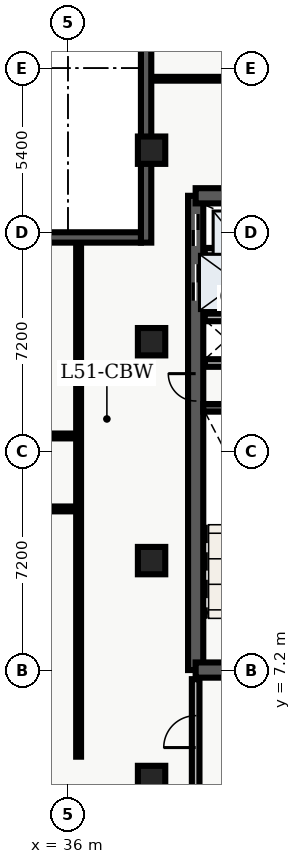
"""IFC4 building model, lengths in metres.
Left out: names, types, materials, properties, quantities, classifications, styles, units other than length and angle.
Written with IfcOpenShell. Run it as: python <this file> out.ifc"""

import sys

from ifc_helpers import new_model, entity, si_unit, converted_unit, direction, frame, origin_with_axes, origin_2d_with_axis, place, context, subcontext, project, spatial, polyline, rectangle, outline, extrude, element, fill, save


model = new_model("IFC4")
c1 = context("Model", 3, precision=1e-05, world=origin_with_axes(), true_north=direction((0.0, 1.0)))
c2 = subcontext(c1, "Body", "Model", "MODEL_VIEW")
j1 = project(units=[si_unit("LENGTHUNIT", "METRE"), converted_unit("PLANEANGLEUNIT", "DEGREE", entity("IfcPlaneAngleMeasure", 0.017), si_unit("PLANEANGLEUNIT", "RADIAN"), dimensions=[0, 0, 0, 0, 0, 0, 0])], contexts=[c1])
p1 = place(None, origin_with_axes())
s1 = spatial("IfcSite", under=j1, at=p1, CompositionType="ELEMENT")
p2 = place(p1, origin_with_axes())
s2 = spatial("IfcBuilding", under=s1, at=p2, CompositionType="ELEMENT")
p3 = place(p2, frame((0.0, 0.0, 208.2), z_axis=(0.0, 0.0, 1.0), x_axis=(1.0, 0.0, 0.0)))
s3 = spatial("IfcBuildingStorey", under=s2, at=p3, CompositionType="ELEMENT", Elevation=208.2)
p4 = place(p3, frame((40.2, 7.2, 0.0), z_axis=(0.0, 0.0, 1.0), x_axis=(0.0, 1.0, 0.0)))
e1 = element("IfcWall", 1, at=p4, inside=s3, PredefinedType="SHEAR", context=c2, shape_type="SweptSolid", body=[
    extrude(outline(polyline([(0.0, -0.25), (15.6, -0.25), (15.6, 0.25), (0.0, 0.25), (0.0, -0.25)])), origin_with_axes(), (0.0, 0.0, 1.0), 3.66),
])
p5 = place(p4, frame((14.475, 0.0, 0.0), z_axis=(0.0, 0.0, 1.0), x_axis=(1.0, 0.0, 0.0)))
e2 = element("IfcOpeningElement", 2, at=p5, cuts=e1, PredefinedType="OPENING", context=c2, shape_type="SweptSolid", body=[
    extrude(rectangle(XDim=1.05, YDim=0.52, at=origin_2d_with_axis()), origin_with_axes(), (0.0, 0.0, 1.0), 2.15),
])
p6 = place(p4, frame((12.75, 0.0, 0.0), z_axis=(0.0, 0.0, 1.0), x_axis=(1.0, 0.0, 0.0)))
e3 = element("IfcOpeningElement", 3, at=p6, cuts=e1, PredefinedType="OPENING", context=c2, shape_type="SweptSolid", body=[
    extrude(rectangle(XDim=1.2, YDim=0.52, at=origin_2d_with_axis()), origin_with_axes(), (0.0, 0.0, 1.0), 2.15),
])
p7 = place(p4, frame((9.3, 0.0, 0.0), z_axis=(0.0, 0.0, 1.0), x_axis=(1.0, 0.0, 0.0)))
e4 = element("IfcOpeningElement", 4, at=p7, cuts=e1, PredefinedType="OPENING", context=c2, shape_type="SweptSolid", body=[
    extrude(rectangle(XDim=0.9, YDim=0.52, at=origin_2d_with_axis()), origin_with_axes(), (0.0, 0.0, 1.0), 2.15),
])
p8 = place(p3, frame((40.2, 7.2, 0.0), z_axis=(0.0, 0.0, 1.0), x_axis=(1.0, 0.0, 0.0)))
e5 = element("IfcWall", 5, at=p8, inside=s3, PredefinedType="SHEAR", context=c2, shape_type="SweptSolid", body=[
    extrude(outline(polyline([(0.0, -0.25), (7.85, -0.25), (7.85, 0.25), (0.0, 0.25), (0.0, -0.25)])), origin_with_axes(), (0.0, 0.0, 1.0), 3.66),
])
p9 = place(p8, frame((2.175, 0.0, 0.0), z_axis=(0.0, 0.0, 1.0), x_axis=(1.0, 0.0, 0.0)))
e6 = element("IfcOpeningElement", 6, at=p9, cuts=e5, PredefinedType="OPENING", context=c2, shape_type="SweptSolid", body=[
    extrude(rectangle(XDim=1.05, YDim=0.52, at=origin_2d_with_axis()), origin_with_axes(), (0.0, 0.0, 1.0), 2.15),
])
p10 = place(p3, frame((40.2, 22.8, 0.0), z_axis=(0.0, 0.0, 1.0), x_axis=(1.0, 0.0, 0.0)))
e7 = element("IfcWall", 7, at=p10, inside=s3, PredefinedType="SHEAR", context=c2, shape_type="SweptSolid", body=[
    extrude(outline(polyline([(0.0, -0.25), (7.85, -0.25), (7.85, 0.25), (0.0, 0.25), (0.0, -0.25)])), origin_with_axes(), (0.0, 0.0, 1.0), 3.66),
])
p11 = place(p10, frame((5.775, 0.0, 0.0), z_axis=(0.0, 0.0, 1.0), x_axis=(1.0, 0.0, 0.0)))
e8 = element("IfcOpeningElement", 8, at=p11, cuts=e7, PredefinedType="OPENING", context=c2, shape_type="SweptSolid", body=[
    extrude(rectangle(XDim=1.05, YDim=0.52, at=origin_2d_with_axis()), origin_with_axes(), (0.0, 0.0, 1.0), 2.15),
])
p12 = place(p3, frame((40.45, 15.825, 0.0), z_axis=(0.0, 0.0, 1.0), x_axis=(1.0, 0.0, 0.0)))
e9 = element("IfcWall", 9, at=p12, inside=s3, PredefinedType="SHEAR", context=c2, shape_type="SweptSolid", body=[
    extrude(outline(polyline([(0.0, -0.125), (3.55, -0.125), (3.55, 0.125), (0.0, 0.125), (0.0, -0.125)])), origin_with_axes(), (0.0, 0.0, 1.0), 3.66),
])
p13 = place(p3, frame((40.5, 17.3, 0.0), z_axis=(0.0, 0.0, 1.0), x_axis=(1.0, 0.0, 0.0)))
e10 = element("IfcWall", 10, at=p13, inside=s3, PredefinedType="SOLIDWALL", context=c2, shape_type="SweptSolid", body=[
    extrude(outline(polyline([(0.0, -0.125), (3.5, -0.125), (3.5, 0.125), (0.0, 0.125), (0.0, -0.125)])), origin_with_axes(), (0.0, 0.0, 1.0), 2.7),
])
p14 = place(p13, frame((2.4, 0.0, 0.0), z_axis=(0.0, 0.0, 1.0), x_axis=(1.0, 0.0, 0.0)))
e11 = element("IfcOpeningElement", 11, at=p14, cuts=e10, PredefinedType="OPENING", context=c2, shape_type="SweptSolid", body=[
    extrude(rectangle(XDim=0.9, YDim=0.27, at=origin_2d_with_axis()), origin_with_axes(), (0.0, 0.0, 1.0), 2.15),
])
p15 = place(p3, frame((40.5, 18.8, 0.0), z_axis=(0.0, 0.0, 1.0), x_axis=(1.0, 0.0, 0.0)))
e12 = element("IfcWall", 12, at=p15, inside=s3, PredefinedType="SOLIDWALL", context=c2, shape_type="SweptSolid", body=[
    extrude(outline(polyline([(0.0, -0.125), (3.5, -0.125), (3.5, 0.125), (0.0, 0.125), (0.0, -0.125)])), origin_with_axes(), (0.0, 0.0, 1.0), 2.7),
])
p16 = place(p3, frame((40.2, 3.1, 0.0), z_axis=(0.0, 0.0, 1.0), x_axis=(0.0, 1.0, 0.0)))
e13 = element("IfcWall", 13, at=p16, inside=s3, PredefinedType="SOLIDWALL", context=c2, shape_type="SweptSolid", body=[
    extrude(outline(polyline([(0.0, -0.125), (3.8, -0.125), (3.8, 0.125), (0.0, 0.125), (0.0, -0.125)])), origin_with_axes(), (0.0, 0.0, 1.0), 2.7),
])
p17 = place(p16, frame((2.075, 0.0, 0.0), z_axis=(0.0, 0.0, 1.0), x_axis=(1.0, 0.0, 0.0)))
e14 = element("IfcOpeningElement", 14, at=p17, cuts=e13, PredefinedType="OPENING", context=c2, shape_type="SweptSolid", body=[
    extrude(rectangle(XDim=1.05, YDim=0.27, at=origin_2d_with_axis()), origin_with_axes(), (0.0, 0.0, 1.0), 2.15),
])
for number, where, z_axis, x_axis in (
    (15, (38.75, 3.6, 0.0), (0.0, 0.0, 1.0), (1.0, 0.0, 0.0)),
    (16, (38.75, 10.8, 0.0), (0.0, 0.0, 1.0), (1.0, 0.0, 0.0)),
    (17, (38.75, 18.0, 0.0), (0.0, 0.0, 1.0), (1.0, 0.0, 0.0)),
    (18, (38.75, 24.3, 0.0), (0.0, 0.0, 1.0), (1.0, 0.0, 0.0)),
):
    element("IfcColumn", number, at=place(p3, frame(where, z_axis=z_axis, x_axis=x_axis)), inside=s3, PredefinedType="COLUMN", context=c2, shape_type="SweptSolid", body=[
        extrude(rectangle(XDim=0.9, YDim=0.9, at=origin_2d_with_axis()), origin_with_axes(), (0.0, 0.0, 1.0), 3.9),
    ])
p18 = place(p3, frame((40.5, 20.96, 0.0), z_axis=(0.0, 0.0, 1.0), x_axis=(1.0, 0.0, 0.0)))
e19 = element("IfcWall", 19, at=p18, inside=s3, PredefinedType="SOLIDWALL", context=c2, shape_type="SweptSolid", body=[
    extrude(outline(polyline([(0.0, -0.125), (3.5, -0.125), (3.5, 0.125), (0.0, 0.125), (0.0, -0.125)])), origin_with_axes(), (0.0, 0.0, 1.0), 2.7),
])
p19 = place(p3, frame((21.15, 12.5, 0.0), z_axis=(0.0, 0.0, 1.0), x_axis=(1.0, 0.0, 0.0)))
e20 = element("IfcWall", 20, at=p19, inside=s3, PredefinedType="PARTITIONING", context=c2, shape_type="SweptSolid", body=[
    extrude(outline(polyline([(0.0, -0.08), (15.2, -0.08), (15.2, 0.08), (0.0, 0.08), (0.0, -0.08)])), origin_with_axes(), (0.0, 0.0, 1.0), 2.7),
])
p20 = place(p19, frame((7.65, 0.0, 0.0), z_axis=(0.0, 0.0, 1.0), x_axis=(1.0, 0.0, 0.0)))
e21 = element("IfcOpeningElement", 21, at=p20, cuts=e20, PredefinedType="OPENING", context=c2, shape_type="SweptSolid", body=[
    extrude(rectangle(XDim=1.0, YDim=0.18, at=origin_2d_with_axis()), origin_with_axes(), (0.0, 0.0, 1.0), 2.15),
])
p21 = place(p3, frame((21.15, 14.9, 0.0), z_axis=(0.0, 0.0, 1.0), x_axis=(1.0, 0.0, 0.0)))
e22 = element("IfcWall", 22, at=p21, inside=s3, PredefinedType="PARTITIONING", context=c2, shape_type="SweptSolid", body=[
    extrude(outline(polyline([(0.0, -0.08), (15.2, -0.08), (15.2, 0.08), (0.0, 0.08), (0.0, -0.08)])), origin_with_axes(), (0.0, 0.0, 1.0), 2.7),
])
p22 = place(p21, frame((1.764, 0.0, 0.0), z_axis=(0.0, 0.0, 1.0), x_axis=(1.0, 0.0, 0.0)))
e23 = element("IfcOpeningElement", 23, at=p22, cuts=e22, PredefinedType="OPENING", context=c2, shape_type="SweptSolid", body=[
    extrude(rectangle(XDim=1.0, YDim=0.18, at=origin_2d_with_axis()), origin_with_axes(), (0.0, 0.0, 1.0), 2.15),
])
p23 = place(p21, frame((4.899, 0.0, 0.0), z_axis=(0.0, 0.0, 1.0), x_axis=(1.0, 0.0, 0.0)))
e24 = element("IfcOpeningElement", 24, at=p23, cuts=e22, PredefinedType="OPENING", context=c2, shape_type="SweptSolid", body=[
    extrude(rectangle(XDim=1.0, YDim=0.18, at=origin_2d_with_axis()), origin_with_axes(), (0.0, 0.0, 1.0), 2.15),
])
p24 = place(p21, frame((8.576, 0.0, 0.0), z_axis=(0.0, 0.0, 1.0), x_axis=(1.0, 0.0, 0.0)))
e25 = element("IfcOpeningElement", 25, at=p24, cuts=e22, PredefinedType="OPENING", context=c2, shape_type="SweptSolid", body=[
    extrude(rectangle(XDim=1.0, YDim=0.18, at=origin_2d_with_axis()), origin_with_axes(), (0.0, 0.0, 1.0), 2.15),
])
p25 = place(p21, frame((12.911, 0.0, 0.0), z_axis=(0.0, 0.0, 1.0), x_axis=(1.0, 0.0, 0.0)))
e26 = element("IfcOpeningElement", 26, at=p25, cuts=e22, PredefinedType="OPENING", context=c2, shape_type="SweptSolid", body=[
    extrude(rectangle(XDim=1.0, YDim=0.18, at=origin_2d_with_axis()), origin_with_axes(), (0.0, 0.0, 1.0), 2.15),
])
p26 = place(p3, frame((36.35, 4.35, 0.0), z_axis=(0.0, 0.0, 1.0), x_axis=(0.0, 1.0, 0.0)))
e27 = element("IfcWall", 27, at=p26, inside=s3, PredefinedType="PARTITIONING", context=c2, shape_type="SweptSolid", body=[
    extrude(outline(polyline([(0.0, -0.08), (16.95, -0.08), (16.95, 0.08), (0.0, 0.08), (0.0, -0.08)])), origin_with_axes(), (0.0, 0.0, 1.0), 2.7),
])
p27 = place(p3, frame((38.735, 26.65, 0.0), z_axis=(0.0, 0.0, 1.0), x_axis=(1.0, 0.0, 0.0)))
e28 = element("IfcWall", 28, at=p27, inside=s3, PredefinedType="PARTITIONING", context=c2, shape_type="SweptSolid", body=[
    extrude(outline(polyline([(0.0, -0.062), (20.905, -0.062), (20.905, 0.062), (0.0, 0.062), (0.0, -0.062)])), origin_with_axes(), (0.0, 0.0, 1.0), 2.7),
])
p28 = place(p27, frame((4.265, 0.0, 0.0), z_axis=(0.0, 0.0, 1.0), x_axis=(1.0, 0.0, 0.0)))
e29 = element("IfcOpeningElement", 29, at=p28, cuts=e28, PredefinedType="OPENING", context=c2, shape_type="SweptSolid", body=[
    extrude(rectangle(XDim=1.0, YDim=0.145, at=origin_2d_with_axis()), origin_with_axes(), (0.0, 0.0, 1.0), 2.15),
])
p29 = place(p3, frame((38.57, 21.26, 0.0), z_axis=(0.0, 0.0, 1.0), x_axis=(0.0, 1.0, 0.0)))
e30 = element("IfcWall", 30, at=p29, inside=s3, PredefinedType="SOLIDWALL", context=c2, shape_type="SweptSolid", body=[
    extrude(outline(polyline([(0.0, -0.17), (7.54, -0.17), (7.54, 0.17), (0.0, 0.17), (0.0, -0.17)])), origin_with_axes(), (0.0, 0.0, 1.0), 3.66),
])
p30 = place(p3, frame((30.346, 21.43, 0.0), z_axis=(0.0, 0.0, 1.0), x_axis=(1.0, 0.0, 0.0)))
e31 = element("IfcWall", 31, at=p30, inside=s3, PredefinedType="SOLIDWALL", context=c2, shape_type="SweptSolid", body=[
    extrude(outline(polyline([(0.0, -0.17), (8.054, -0.17), (8.054, 0.17), (0.0, 0.17), (0.0, -0.17)])), origin_with_axes(), (0.0, 0.0, 1.0), 3.66),
])
p31 = place(p30, frame((4.027, 0.0, 0.45), z_axis=(0.0, 0.0, 1.0), x_axis=(1.0, 0.0, 0.0)))
e32 = element("IfcOpeningElement", 32, at=p31, cuts=e31, PredefinedType="OPENING", context=c2, shape_type="SweptSolid", body=[
    extrude(rectangle(XDim=1.8, YDim=0.36, at=origin_2d_with_axis()), origin_with_axes(), (0.0, 0.0, 1.0), 2.1),
])
p32 = place(p4, frame((14.475, 0.0, 0.0), z_axis=(0.0, 0.0, 1.0), x_axis=(1.0, 0.0, 0.0)))
e33 = element("IfcDoor", 33, at=p32, inside=s3, OperationType="SLIDING_TO_RIGHT", PredefinedType="DOOR", context=c2, shape_type="SweptSolid", body=[
    extrude(rectangle(XDim=1.05, YDim=0.09, at=origin_2d_with_axis()), origin_with_axes(), (0.0, 0.0, 1.0), 2.15),
])
fill(e2, e33)
p33 = place(p4, frame((12.75, 0.0, 0.0), z_axis=(0.0, 0.0, 1.0), x_axis=(1.0, 0.0, 0.0)))
e34 = element("IfcDoor", 34, at=p33, inside=s3, OperationType="DOUBLE_DOOR_SLIDING", PredefinedType="DOOR", context=c2, shape_type="SweptSolid", body=[
    extrude(rectangle(XDim=1.2, YDim=0.09, at=origin_2d_with_axis()), origin_with_axes(), (0.0, 0.0, 1.0), 2.15),
])
fill(e3, e34)
p34 = place(p4, frame((9.3, 0.0, 0.0), z_axis=(0.0, 0.0, 1.0), x_axis=(1.0, 0.0, 0.0)))
e35 = element("IfcDoor", 35, at=p34, inside=s3, OperationType="SINGLE_SWING_RIGHT", PredefinedType="DOOR", context=c2, shape_type="SweptSolid", body=[
    extrude(rectangle(XDim=0.9, YDim=0.09, at=origin_2d_with_axis()), origin_with_axes(), (0.0, 0.0, 1.0), 2.15),
])
fill(e4, e35)
p35 = place(p16, frame((2.075, 0.0, 0.0), z_axis=(0.0, 0.0, 1.0), x_axis=(1.0, 0.0, 0.0)))
e36 = element("IfcDoor", 36, at=p35, inside=s3, OperationType="SINGLE_SWING_LEFT", PredefinedType="DOOR", context=c2, shape_type="SweptSolid", body=[
    extrude(rectangle(XDim=1.05, YDim=0.09, at=origin_2d_with_axis()), origin_with_axes(), (0.0, 0.0, 1.0), 2.15),
])
fill(e14, e36)
save(model, sys.argv[1])
